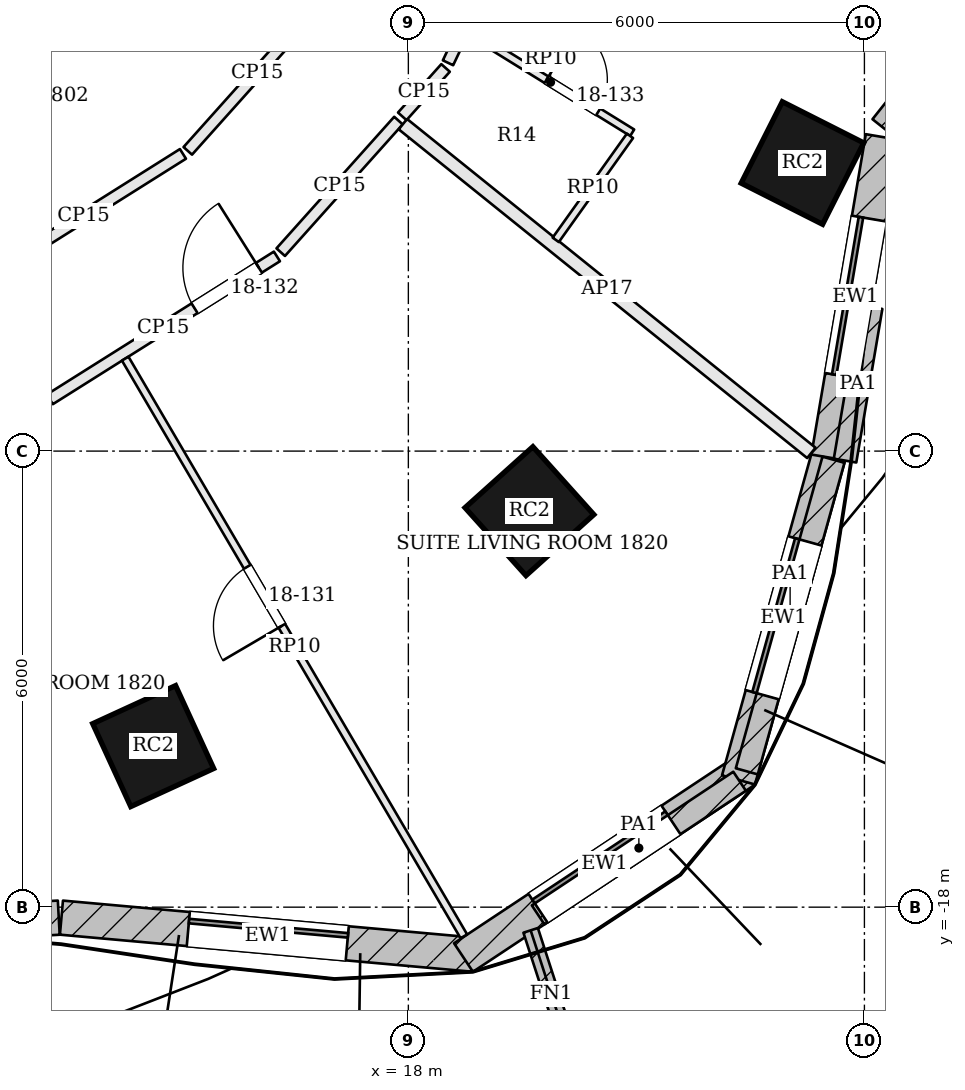
"""IFC4 building model, lengths in metres.
Left out: names, types, materials, properties, quantities, classifications, styles, units other than length and angle.
Written with IfcOpenShell. Run it as: python <this file> out.ifc"""

import sys

from ifc_helpers import new_model, si_unit, direction, frame, frame_2d, origin, origin_2d, place, context, subcontext, project, spatial, rectangle, extrude, element, fill, save


model = new_model("IFC4")
c1 = context("Model", 3, precision=1e-05, world=origin(), true_north=direction((0.0, 1.0)))
c2 = subcontext(c1, "Body", "Model", "MODEL_VIEW")
j1 = project(units=[si_unit("LENGTHUNIT", "METRE"), si_unit("PLANEANGLEUNIT", "RADIAN")], contexts=[c1])
p1 = place(None, origin())
s1 = spatial("IfcSite", under=j1, at=p1, CompositionType="ELEMENT")
p2 = place(p1, origin())
s2 = spatial("IfcBuilding", under=s1, at=p2, CompositionType="ELEMENT")
p3 = place(p2, frame((0.0, 0.0, 81.6)))
s3 = spatial("IfcBuildingStorey", under=s2, at=p3, CompositionType="ELEMENT", Elevation=81.6)
for number, where, z_axis, x_axis in (
    (1, (14.643, -15.881, -0.7), (0.0, 0.0, 1.0), (0.909, 0.417, 0.0)),
    (2, (19.593, -12.79, -0.7), (0.0, 0.0, 1.0), (0.744, 0.668, 0.0)),
    (3, (23.185, -8.21, -0.7), (0.0, 0.0, 1.0), (0.451, 0.893, 0.0)),
):
    element("IfcColumn", number, at=place(p3, frame(where, z_axis=z_axis, x_axis=x_axis)), inside=s3, PredefinedType="COLUMN", context=c2, shape_type="SweptSolid", body=[
        extrude(rectangle(XDim=1.2, YDim=1.2, at=origin_2d()), origin(), (0.0, 0.0, 1.0), 4.3),
    ])
p4 = place(p3, frame((9.803, -18.334, 0.0), z_axis=(0.0, 0.0, 1.0), x_axis=(0.998525941495, 0.054276552602, 0.0)))
e4 = element("IfcWall", 4, at=p4, inside=s3, PredefinedType="SOLIDWALL", context=c2, shape_type="SweptSolid", body=[
    extrude(rectangle(XDim=3.603, YDim=0.45, at=frame_2d((1.802, 0.0))), origin(), (0.0, 0.0, 1.0), 3.4),
])
p5 = place(p4, frame((0.751, 0.0, 0.9)))
e5 = element("IfcOpeningElement", 5, at=p5, cuts=e4, PredefinedType="OPENING", context=c2, shape_type="SweptSolid", body=[
    extrude(rectangle(XDim=2.1, YDim=2.0, at=frame_2d((1.05, 1.0))), frame((0.0, 0.235, 0.0), z_axis=(0.0, -1.0, 0.0), x_axis=(1.0, 0.0, 0.0)), (0.0, 0.0, 1.0), 0.47),
])
p6 = place(p3, frame((13.436, -18.138, 0.0), z_axis=(0.0, 0.0, 1.0), x_axis=(0.99598810213, -0.089485755376, 0.0)))
e6 = element("IfcWall", 6, at=p6, inside=s3, PredefinedType="SOLIDWALL", context=c2, shape_type="SweptSolid", body=[
    extrude(rectangle(XDim=5.451, YDim=0.45, at=frame_2d((2.726, 0.0))), origin(), (0.0, 0.0, 1.0), 3.4),
])
p7 = place(p6, frame((1.676, 0.0, 0.9)))
e7 = element("IfcOpeningElement", 7, at=p7, cuts=e6, PredefinedType="OPENING", context=c2, shape_type="SweptSolid", body=[
    extrude(rectangle(XDim=2.1, YDim=2.0, at=frame_2d((1.05, 1.0))), frame((0.0, 0.235, 0.0), z_axis=(0.0, -1.0, 0.0), x_axis=(1.0, 0.0, 0.0)), (0.0, 0.0, 1.0), 0.47),
])
p8 = place(p3, frame((18.726, -18.663, 0.0), z_axis=(0.0, 0.0, 1.0), x_axis=(0.83333921474, 0.552761931736, 0.0)))
e8 = element("IfcWall", 8, at=p8, inside=s3, PredefinedType="SOLIDWALL", context=c2, shape_type="SweptSolid", body=[
    extrude(rectangle(XDim=4.451, YDim=0.45, at=frame_2d((2.225, 0.0))), origin(), (0.0, 0.0, 1.0), 3.4),
])
p9 = place(p8, frame((1.175, 0.0, 0.9)))
e9 = element("IfcOpeningElement", 9, at=p9, cuts=e8, PredefinedType="OPENING", context=c2, shape_type="SweptSolid", body=[
    extrude(rectangle(XDim=2.1, YDim=2.0, at=frame_2d((1.05, 1.0))), frame((0.0, 0.235, 0.0), z_axis=(0.0, -1.0, 0.0), x_axis=(1.0, 0.0, 0.0)), (0.0, 0.0, 1.0), 0.47),
])
p10 = place(p3, frame((22.344, -16.326, 0.0), z_axis=(0.0, 0.0, 1.0), x_axis=(0.267925456304, 0.963439645159, 0.0)))
e10 = element("IfcWall", 10, at=p10, inside=s3, PredefinedType="SOLIDWALL", context=c2, shape_type="SweptSolid", body=[
    extrude(rectangle(XDim=4.427, YDim=0.45, at=frame_2d((2.213, 0.0))), origin(), (0.0, 0.0, 1.0), 3.4),
])
p11 = place(p10, frame((1.164, 0.0, 0.9)))
e11 = element("IfcOpeningElement", 11, at=p11, cuts=e10, PredefinedType="OPENING", context=c2, shape_type="SweptSolid", body=[
    extrude(rectangle(XDim=2.1, YDim=2.0, at=frame_2d((1.05, 1.0))), frame((0.0, 0.235, 0.0), z_axis=(0.0, -1.0, 0.0), x_axis=(1.0, 0.0, 0.0)), (0.0, 0.0, 1.0), 0.47),
])
p12 = place(p3, frame((23.524, -12.083, 0.0), z_axis=(0.0, 0.0, 1.0), x_axis=(0.167445072349, 0.985881406532, 0.0)))
e12 = element("IfcWall", 12, at=p12, inside=s3, PredefinedType="SOLIDWALL", context=c2, shape_type="SweptSolid", body=[
    extrude(rectangle(XDim=4.275, YDim=0.45, at=frame_2d((2.137, 0.0))), origin(), (0.0, 0.0, 1.0), 3.4),
])
p13 = place(p12, frame((1.087, 0.0, 0.9)))
e13 = element("IfcOpeningElement", 13, at=p13, cuts=e12, PredefinedType="OPENING", context=c2, shape_type="SweptSolid", body=[
    extrude(rectangle(XDim=2.1, YDim=2.0, at=frame_2d((1.05, 1.0))), frame((0.0, 0.235, 0.0), z_axis=(0.0, -1.0, 0.0), x_axis=(1.0, 0.0, 0.0)), (0.0, 0.0, 1.0), 0.47),
])
p14 = place(p3, frame((24.282, -7.774, 0.0), z_axis=(0.0, 0.0, 1.0), x_axis=(0.621735490397, 0.783227285008, 0.0)))
e14 = element("IfcWall", 14, at=p14, inside=s3, PredefinedType="SOLIDWALL", context=c2, shape_type="SweptSolid", body=[
    extrude(rectangle(XDim=4.625, YDim=0.45, at=frame_2d((2.312, 0.0))), origin(), (0.0, 0.0, 1.0), 3.4),
])
p15 = place(p14, frame((1.262, 0.0, 0.9)))
e15 = element("IfcOpeningElement", 15, at=p15, cuts=e14, PredefinedType="OPENING", context=c2, shape_type="SweptSolid", body=[
    extrude(rectangle(XDim=2.1, YDim=2.0, at=frame_2d((1.05, 1.0))), frame((0.0, 0.235, 0.0), z_axis=(0.0, -1.0, 0.0), x_axis=(1.0, 0.0, 0.0)), (0.0, 0.0, 1.0), 0.47),
])
p16 = place(p3, frame((19.609, -18.305, 0.0), z_axis=(0.0, 0.0, 1.0), x_axis=(0.308600224758, -0.951191832008, 0.0)))
e16 = element("IfcWall", 16, at=p16, inside=s3, PredefinedType="SOLIDWALL", context=c2, shape_type="SweptSolid", body=[
    extrude(rectangle(XDim=1.75, YDim=0.2, at=frame_2d((0.875, 0.0))), origin(), (0.0, 0.0, 1.0), 3.4),
])
p17 = place(p3, frame((19.708, -18.101, 3.6), z_axis=(0.0, 0.0, 1.0), x_axis=(0.833370664286, 0.552714515738, 0.0)))
e17 = element("IfcWall", 17, at=p17, inside=s3, PredefinedType="PARAPET", context=c2, shape_type="SweptSolid", body=[
    extrude(rectangle(XDim=3.18, YDim=0.3, at=frame_2d((1.59, 0.0))), origin(), (0.0, 0.0, 1.0), 1.1),
])
p18 = place(p3, frame((22.452, -16.213, 3.6), z_axis=(0.0, 0.0, 1.0), x_axis=(0.267993020858, 0.963420853403, 0.0)))
e18 = element("IfcWall", 18, at=p18, inside=s3, PredefinedType="PARAPET", context=c2, shape_type="SweptSolid", body=[
    extrude(rectangle(XDim=4.255, YDim=0.3, at=frame_2d((2.128, 0.0))), origin(), (0.0, 0.0, 1.0), 1.1),
])
p19 = place(p3, frame((23.745, -12.125, 3.6), z_axis=(0.0, 0.0, 1.0), x_axis=(0.16743218322, 0.985883595574, 0.0)))
e19 = element("IfcWall", 19, at=p19, inside=s3, PredefinedType="PARAPET", context=c2, shape_type="SweptSolid", body=[
    extrude(rectangle(XDim=2.049, YDim=0.3, at=frame_2d((1.024, 0.0))), origin(), (0.0, 0.0, 1.0), 1.1),
])
p20 = place(p3, frame((13.283, -11.319, 0.0), z_axis=(0.0, 0.0, 1.0), x_axis=(0.84630789582, 0.532694044901, 0.0)))
e20 = element("IfcWall", 20, at=p20, inside=s3, PredefinedType="PARTITIONING", context=c2, shape_type="SweptSolid", body=[
    extrude(rectangle(XDim=3.53, YDim=0.15, at=frame_2d((1.765, 0.0))), origin(), (0.0, 0.0, 1.0), 2.784),
])
p21 = place(p20, frame((2.25, 0.0, 0.0)))
e21 = element("IfcOpeningElement", 21, at=p21, cuts=e20, PredefinedType="OPENING", context=c2, shape_type="SweptSolid", body=[
    extrude(rectangle(XDim=1.0, YDim=2.1, at=frame_2d((0.5, 1.05))), frame((0.0, 0.085, 0.0), z_axis=(0.0, -1.0, 0.0), x_axis=(1.0, 0.0, 0.0)), (0.0, 0.0, 1.0), 0.17),
])
p22 = place(p3, frame((16.321, -9.383, 0.0), z_axis=(0.0, 0.0, 1.0), x_axis=(0.666871661175, 0.745172589083, 0.0)))
e22 = element("IfcWall", 22, at=p22, inside=s3, PredefinedType="PARTITIONING", context=c2, shape_type="SweptSolid", body=[
    extrude(rectangle(XDim=2.323, YDim=0.15, at=frame_2d((1.162, 0.0))), origin(), (0.0, 0.0, 1.0), 2.784),
])
p23 = place(p3, frame((23.302, -12.023, 0.0), z_axis=(0.0, 0.0, 1.0), x_axis=(-0.779049211338, 0.626962779049, 0.0)))
e23 = element("IfcWall", 23, at=p23, inside=s3, PredefinedType="PARTITIONING", context=c2, shape_type="SweptSolid", body=[
    extrude(rectangle(XDim=6.898, YDim=0.175, at=frame_2d((3.449, 0.0))), origin(), (0.0, 0.0, 1.0), 2.784),
])
p24 = place(p3, frame((17.92, -7.596, 0.0), z_axis=(0.0, 0.0, 1.0), x_axis=(0.666719674525, 0.745308577437, 0.0)))
e24 = element("IfcWall", 24, at=p24, inside=s3, PredefinedType="PARTITIONING", context=c2, shape_type="SweptSolid", body=[
    extrude(rectangle(XDim=0.854, YDim=0.15, at=frame_2d((0.427, 0.0))), origin(), (0.0, 0.0, 1.0), 2.784),
])
p25 = place(p3, frame((18.522, -6.891, 0.0), z_axis=(0.0, 0.0, 1.0), x_axis=(0.428157819028, 0.903703979191, 0.0)))
e25 = element("IfcWall", 25, at=p25, inside=s3, PredefinedType="PARTITIONING", context=c2, shape_type="SweptSolid", body=[
    extrude(rectangle(XDim=2.349, YDim=0.15, at=frame_2d((1.175, 0.0))), origin(), (0.0, 0.0, 1.0), 2.784),
])
p26 = place(p3, frame((16.925, -6.009, 0.0), z_axis=(0.0, 0.0, 1.0), x_axis=(-0.666893859891, -0.745152722359, 0.0)))
e26 = element("IfcWall", 26, at=p26, inside=s3, PredefinedType="PARTITIONING", context=c2, shape_type="SweptSolid", body=[
    extrude(rectangle(XDim=2.739, YDim=0.15, at=frame_2d((1.37, 0.0))), origin(), (0.0, 0.0, 1.0), 2.784),
])
p27 = place(p3, frame((15.034, -8.09, 0.0), z_axis=(0.0, 0.0, 1.0), x_axis=(-0.846322679414, -0.532670557014, 0.0)))
e27 = element("IfcWall", 27, at=p27, inside=s3, PredefinedType="PARTITIONING", context=c2, shape_type="SweptSolid", body=[
    extrude(rectangle(XDim=3.085, YDim=0.15, at=frame_2d((1.543, 0.0))), origin(), (0.0, 0.0, 1.0), 2.784),
])
p28 = place(p3, frame((18.73, -18.384, 0.0), z_axis=(0.0, 0.0, 1.0), x_axis=(-0.50573941389, 0.862686295961, 0.0)))
e28 = element("IfcWall", 28, at=p28, inside=s3, PredefinedType="PARTITIONING", context=c2, shape_type="SweptSolid", body=[
    extrude(rectangle(XDim=8.81, YDim=0.1, at=frame_2d((4.405, 0.0))), origin(), (0.0, 0.0, 1.0), 2.784),
])
p29 = place(p28, frame((4.735, 0.0, 0.0)))
e29 = element("IfcOpeningElement", 29, at=p29, cuts=e28, PredefinedType="OPENING", context=c2, shape_type="SweptSolid", body=[
    extrude(rectangle(XDim=0.9, YDim=2.4, at=frame_2d((0.45, 1.2))), frame((0.0, 0.06, 0.0), z_axis=(0.0, -1.0, 0.0), x_axis=(1.0, 0.0, 0.0)), (0.0, 0.0, 1.0), 0.12),
])
p30 = place(p3, frame((18.798, -6.483, 0.0), z_axis=(0.0, 0.0, 1.0), x_axis=(0.850374338708, -0.526178186612, 0.0)))
e30 = element("IfcWall", 30, at=p30, inside=s3, PredefinedType="PARTITIONING", context=c2, shape_type="SweptSolid", body=[
    extrude(rectangle(XDim=2.525, YDim=0.1, at=frame_2d((1.263, 0.0))), origin(), (0.0, 0.0, 1.0), 2.784),
])
p31 = place(p30, frame((1.2, 0.0, 0.0)))
e31 = element("IfcOpeningElement", 31, at=p31, cuts=e30, PredefinedType="OPENING", context=c2, shape_type="SweptSolid", body=[
    extrude(rectangle(XDim=0.8, YDim=2.1, at=frame_2d((0.4, 1.05))), frame((0.0, 0.06, 0.0), z_axis=(0.0, -1.0, 0.0), x_axis=(1.0, 0.0, 0.0)), (0.0, 0.0, 1.0), 0.12),
])
p32 = place(p3, frame((20.916, -7.852, 0.0), z_axis=(0.0, 0.0, 1.0), x_axis=(-0.580922254291, -0.813959049627, 0.0)))
e32 = element("IfcWall", 32, at=p32, inside=s3, PredefinedType="PARTITIONING", context=c2, shape_type="SweptSolid", body=[
    extrude(rectangle(XDim=1.681, YDim=0.1, at=frame_2d((0.841, 0.0))), origin(), (0.0, 0.0, 1.0), 2.784),
])
p33 = place(p7, origin())
e33 = element("IfcWindow", 33, at=p33, inside=s3, PartitioningType="SINGLE_PANEL", PredefinedType="WINDOW", context=c2, shape_type="SweptSolid", body=[
    extrude(rectangle(XDim=2.1, YDim=2.0, at=frame_2d((1.05, 1.0))), frame((0.0, 0.135, 0.0), z_axis=(0.0, -1.0, 0.0), x_axis=(1.0, 0.0, 0.0)), (0.0, 0.0, 1.0), 0.06),
])
fill(e7, e33)
p34 = place(p9, origin())
e34 = element("IfcWindow", 34, at=p34, inside=s3, PartitioningType="SINGLE_PANEL", PredefinedType="WINDOW", context=c2, shape_type="SweptSolid", body=[
    extrude(rectangle(XDim=2.1, YDim=2.0, at=frame_2d((1.05, 1.0))), frame((0.0, 0.135, 0.0), z_axis=(0.0, -1.0, 0.0), x_axis=(1.0, 0.0, 0.0)), (0.0, 0.0, 1.0), 0.06),
])
fill(e9, e34)
p35 = place(p11, origin())
e35 = element("IfcWindow", 35, at=p35, inside=s3, PartitioningType="SINGLE_PANEL", PredefinedType="WINDOW", context=c2, shape_type="SweptSolid", body=[
    extrude(rectangle(XDim=2.1, YDim=2.0, at=frame_2d((1.05, 1.0))), frame((0.0, 0.135, 0.0), z_axis=(0.0, -1.0, 0.0), x_axis=(1.0, 0.0, 0.0)), (0.0, 0.0, 1.0), 0.06),
])
fill(e11, e35)
p36 = place(p13, origin())
e36 = element("IfcWindow", 36, at=p36, inside=s3, PartitioningType="SINGLE_PANEL", PredefinedType="WINDOW", context=c2, shape_type="SweptSolid", body=[
    extrude(rectangle(XDim=2.1, YDim=2.0, at=frame_2d((1.05, 1.0))), frame((0.0, 0.135, 0.0), z_axis=(0.0, -1.0, 0.0), x_axis=(1.0, 0.0, 0.0)), (0.0, 0.0, 1.0), 0.06),
])
fill(e13, e36)
p37 = place(p29, origin())
e37 = element("IfcDoor", 37, at=p37, inside=s3, OperationType="SINGLE_SWING_LEFT", PredefinedType="DOOR", context=c2, shape_type="SweptSolid", body=[
    extrude(rectangle(XDim=0.9, YDim=2.4, at=frame_2d((0.45, 1.2))), frame((0.0, 0.025, 0.0), z_axis=(0.0, -1.0, 0.0), x_axis=(1.0, 0.0, 0.0)), (0.0, 0.0, 1.0), 0.05),
])
fill(e29, e37)
p38 = place(p21, origin())
e38 = element("IfcDoor", 38, at=p38, inside=s3, OperationType="SINGLE_SWING_RIGHT", PredefinedType="DOOR", context=c2, shape_type="SweptSolid", body=[
    extrude(rectangle(XDim=1.0, YDim=2.1, at=frame_2d((0.5, 1.05))), frame((0.0, 0.025, 0.0), z_axis=(0.0, -1.0, 0.0), x_axis=(1.0, 0.0, 0.0)), (0.0, 0.0, 1.0), 0.05),
])
fill(e21, e38)
p39 = place(p31, origin())
e39 = element("IfcDoor", 39, at=p39, inside=s3, OperationType="SINGLE_SWING_LEFT", PredefinedType="DOOR", context=c2, shape_type="SweptSolid", body=[
    extrude(rectangle(XDim=0.8, YDim=2.1, at=frame_2d((0.4, 1.05))), frame((0.0, 0.025, 0.0), z_axis=(0.0, -1.0, 0.0), x_axis=(1.0, 0.0, 0.0)), (0.0, 0.0, 1.0), 0.05),
])
fill(e31, e39)
save(model, sys.argv[1])
